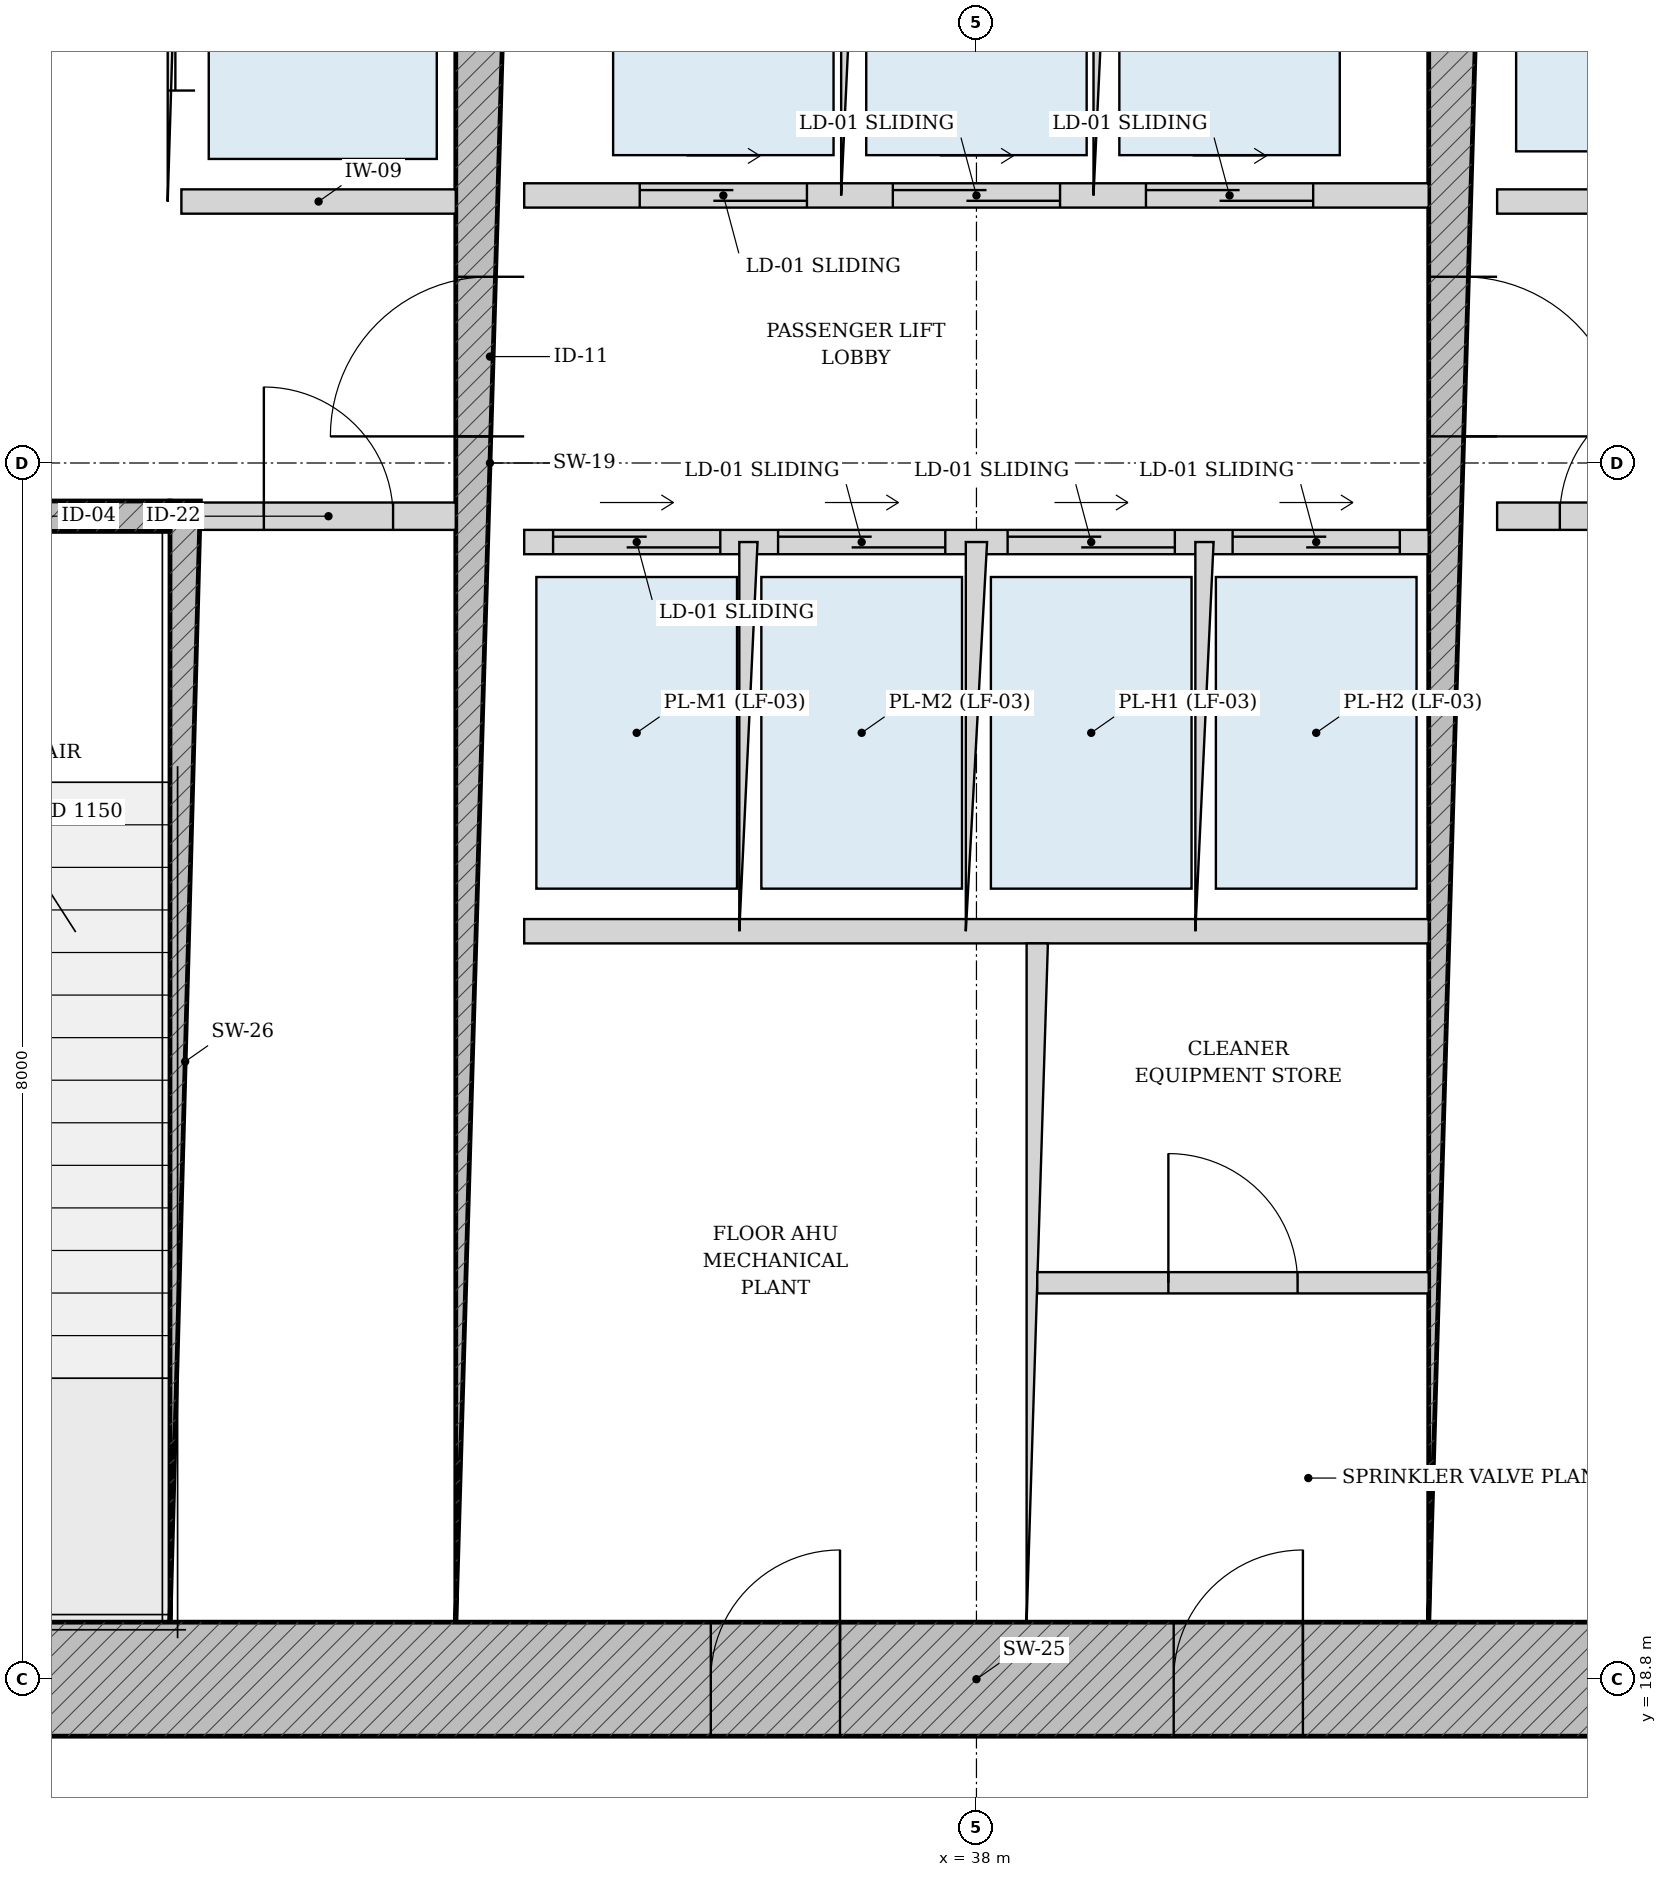
"""IFC4 building model, lengths in metres.
Left out: names, types, materials, properties, quantities, classifications, styles, units other than length and angle.
Written with IfcOpenShell. Run it as: python <this file> out.ifc"""

import sys

from ifc_helpers import new_model, si_unit, direction, frame, frame_2d, origin, place, context, subcontext, project, spatial, rectangle, extrude, source, transform, mapped, element, fill, save


model = new_model("IFC4")
c1 = context("Model", 3, precision=1e-05, world=origin(), true_north=direction((-0.2419218956, 0.970295726276)))
c2 = subcontext(c1, "Body", "Model", "MODEL_VIEW")
j1 = project(units=[si_unit("LENGTHUNIT", "METRE"), si_unit("PLANEANGLEUNIT", "RADIAN")], contexts=[c1])
p1 = place(None, origin())
s1 = spatial("IfcSite", under=j1, at=p1, CompositionType="ELEMENT")
p2 = place(p1, origin())
s2 = spatial("IfcBuilding", under=s1, at=p2, CompositionType="ELEMENT")
p3 = place(p2, origin())
s3 = spatial("IfcBuildingStorey", under=s2, at=p3, CompositionType="ELEMENT", Elevation=0.0)
p4 = place(p3, frame((28.625, 18.8, 0.0), z_axis=(0.0, 0.0, 1.0), x_axis=(1.0, 0.0, 0.0)))
e1 = element("IfcWall", 1, at=p4, inside=s3, PredefinedType="SHEAR", context=c2, shape_type="SweptSolid", body=[
    extrude(rectangle(XDim=18.75, YDim=0.75, at=frame_2d((9.375, 0.0))), origin(), (0.0, 0.0, 1.0), 5.1),
])
p5 = place(p4, frame((7.627, 0.0, 0.0)))
e2 = element("IfcOpeningElement", 2, at=p5, cuts=e1, PredefinedType="OPENING", context=c2, shape_type="SweptSolid", body=[
    extrude(rectangle(XDim=0.85, YDim=2.1, at=frame_2d((0.425, 1.05))), frame((0.0, 0.385, 0.0), z_axis=(0.0, -1.0, 0.0), x_axis=(1.0, 0.0, 0.0)), (0.0, 0.0, 1.0), 0.77),
])
p6 = place(p4, frame((10.673, 0.0, 0.0)))
e3 = element("IfcOpeningElement", 3, at=p6, cuts=e1, PredefinedType="OPENING", context=c2, shape_type="SweptSolid", body=[
    extrude(rectangle(XDim=0.85, YDim=2.1, at=frame_2d((0.425, 1.05))), frame((0.0, 0.385, 0.0), z_axis=(0.0, -1.0, 0.0), x_axis=(1.0, 0.0, 0.0)), (0.0, 0.0, 1.0), 0.77),
])
p7 = place(p3, frame((32.795, 19.175, 0.0), z_axis=(0.0, 0.0, 1.0), x_axis=(0.0, 1.0, 0.0)))
e4 = element("IfcWall", 4, at=p7, inside=s3, PredefinedType="SOLIDWALL", context=c2, shape_type="SweptSolid", body=[
    extrude(rectangle(XDim=7.375, YDim=0.2, at=frame_2d((3.688, 0.0))), origin(), (0.0, 0.0, 1.0), 5.1),
])
p8 = place(p3, frame((29.375, 26.45, 0.0), z_axis=(0.0, 0.0, 1.0), x_axis=(1.0, 0.0, 0.0)))
e5 = element("IfcWall", 5, at=p8, inside=s3, PredefinedType="SOLIDWALL", context=c2, shape_type="SweptSolid", body=[
    extrude(rectangle(XDim=3.32, YDim=0.2, at=frame_2d((1.66, 0.0))), origin(), (0.0, 0.0, 1.0), 5.1),
])
p9 = place(p8, frame((1.185, 0.0, 0.0)))
e6 = element("IfcOpeningElement", 6, at=p9, cuts=e5, PredefinedType="OPENING", context=c2, shape_type="SweptSolid", body=[
    extrude(rectangle(XDim=0.95, YDim=2.15, at=frame_2d((0.475, 1.075))), frame((0.0, 0.11, 0.0), z_axis=(0.0, -1.0, 0.0), x_axis=(1.0, 0.0, 0.0)), (0.0, 0.0, 1.0), 0.22),
])
p10 = place(p3, frame((34.8, 19.175, 0.0), z_axis=(0.0, 0.0, 1.0), x_axis=(0.0, 1.0, 0.0)))
e7 = element("IfcWall", 7, at=p10, inside=s3, PredefinedType="SHEAR", context=c2, shape_type="SweptSolid", body=[
    extrude(rectangle(XDim=15.25, YDim=0.45, at=frame_2d((7.625, 0.0))), origin(), (0.0, 0.0, 1.0), 5.1),
])
p11 = place(p10, frame((7.8, 0.0, 0.0)))
e8 = element("IfcOpeningElement", 8, at=p11, cuts=e7, PredefinedType="OPENING", context=c2, shape_type="SweptSolid", body=[
    extrude(rectangle(XDim=1.05, YDim=2.15, at=frame_2d((0.525, 1.075))), frame((0.0, 0.235, 0.0), z_axis=(0.0, -1.0, 0.0), x_axis=(1.0, 0.0, 0.0)), (0.0, 0.0, 1.0), 0.47),
])
p12 = place(p3, frame((41.2, 19.175, 0.0), z_axis=(0.0, 0.0, 1.0), x_axis=(0.0, 1.0, 0.0)))
e9 = element("IfcWall", 9, at=p12, inside=s3, PredefinedType="SHEAR", context=c2, shape_type="SweptSolid", body=[
    extrude(rectangle(XDim=15.25, YDim=0.45, at=frame_2d((7.625, 0.0))), origin(), (0.0, 0.0, 1.0), 5.1),
])
p13 = place(p12, frame((7.8, 0.0, 0.0)))
e10 = element("IfcOpeningElement", 10, at=p13, cuts=e9, PredefinedType="OPENING", context=c2, shape_type="SweptSolid", body=[
    extrude(rectangle(XDim=1.05, YDim=2.15, at=frame_2d((0.525, 1.075))), frame((0.0, 0.235, 0.0), z_axis=(0.0, -1.0, 0.0), x_axis=(1.0, 0.0, 0.0)), (0.0, 0.0, 1.0), 0.47),
])
p14 = place(p3, frame((32.9, 26.45, 0.0), z_axis=(0.0, 0.0, 1.0), x_axis=(1.0, 0.0, 0.0)))
e11 = element("IfcWall", 11, at=p14, inside=s3, PredefinedType="PARTITIONING", context=c2, shape_type="SweptSolid", body=[
    extrude(rectangle(XDim=1.675, YDim=0.18, at=frame_2d((0.837, 0.0))), origin(), (0.0, 0.0, 1.0), 5.1),
])
p15 = place(p14, frame((0.413, 0.0, 0.0)))
e12 = element("IfcOpeningElement", 12, at=p15, cuts=e11, PredefinedType="OPENING", context=c2, shape_type="SweptSolid", body=[
    extrude(rectangle(XDim=0.85, YDim=2.1, at=frame_2d((0.425, 1.05))), frame((0.0, 0.1, 0.0), z_axis=(0.0, -1.0, 0.0), x_axis=(1.0, 0.0, 0.0)), (0.0, 0.0, 1.0), 0.2),
])
p16 = place(p3, frame((41.425, 26.45, 0.0), z_axis=(0.0, 0.0, 1.0), x_axis=(1.0, 0.0, 0.0)))
e13 = element("IfcWall", 13, at=p16, inside=s3, PredefinedType="PARTITIONING", context=c2, shape_type="SweptSolid", body=[
    extrude(rectangle(XDim=1.675, YDim=0.18, at=frame_2d((0.837, 0.0))), origin(), (0.0, 0.0, 1.0), 5.1),
])
p17 = place(p16, frame((0.413, 0.0, 0.0)))
e14 = element("IfcOpeningElement", 14, at=p17, cuts=e13, PredefinedType="OPENING", context=c2, shape_type="SweptSolid", body=[
    extrude(rectangle(XDim=0.85, YDim=2.1, at=frame_2d((0.425, 1.05))), frame((0.0, 0.1, 0.0), z_axis=(0.0, -1.0, 0.0), x_axis=(1.0, 0.0, 0.0)), (0.0, 0.0, 1.0), 0.2),
])
p18 = place(p3, frame((32.77, 28.52, 0.0), z_axis=(0.0, 0.0, 1.0), x_axis=(0.0, 1.0, 0.0)))
e15 = element("IfcWall", 15, at=p18, inside=s3, PredefinedType="PARTITIONING", context=c2, shape_type="SweptSolid", body=[
    extrude(rectangle(XDim=5.905, YDim=0.18, at=frame_2d((2.953, 0.0))), origin(), (0.0, 0.0, 1.0), 5.1),
])
p19 = place(p18, frame((3.655, 0.0, 0.0)))
e16 = element("IfcOpeningElement", 16, at=p19, cuts=e15, PredefinedType="OPENING", context=c2, shape_type="SweptSolid", body=[
    extrude(rectangle(XDim=1.15, YDim=2.2, at=frame_2d((0.575, 1.1))), frame((0.0, 0.1, 0.0), z_axis=(0.0, -1.0, 0.0), x_axis=(1.0, 0.0, 0.0)), (0.0, 0.0, 1.0), 0.2),
])
p20 = place(p18, frame((0.73, 0.0, 0.0)))
e17 = element("IfcOpeningElement", 17, at=p20, cuts=e15, PredefinedType="OPENING", context=c2, shape_type="SweptSolid", body=[
    extrude(rectangle(XDim=1.2, YDim=2.25, at=frame_2d((0.6, 1.125))), frame((0.0, 0.1, 0.0), z_axis=(0.0, -1.0, 0.0), x_axis=(1.0, 0.0, 0.0)), (0.0, 0.0, 1.0), 0.2),
])
for number, where, z_axis, x_axis in (
    (18, (32.77, 28.52, 0.0), (0.0, 0.0, 1.0), (1.0, 0.0, 0.0)),
    (19, (41.425, 28.52, 0.0), (0.0, 0.0, 1.0), (1.0, 0.0, 0.0)),
):
    element("IfcWall", number, at=place(p3, frame(where, z_axis=z_axis, x_axis=x_axis)), inside=s3, PredefinedType="PARTITIONING", context=c2, shape_type="SweptSolid", body=[
        extrude(rectangle(XDim=1.805, YDim=0.16, at=frame_2d((0.902, 0.0))), origin(), (0.0, 0.0, 1.0), 5.1),
    ])
p21 = place(p3, frame((35.025, 28.56, 0.0), z_axis=(0.0, 0.0, 1.0), x_axis=(1.0, 0.0, 0.0)))
e20 = element("IfcWall", 20, at=p21, inside=s3, PredefinedType="PARTITIONING", context=c2, shape_type="SweptSolid", body=[
    extrude(rectangle(XDim=5.95, YDim=0.16, at=frame_2d((2.975, 0.0))), origin(), (0.0, 0.0, 1.0), 5.1),
])
p22 = place(p21, frame((0.76, 0.0, 0.0)))
e21 = element("IfcOpeningElement", 21, at=p22, cuts=e20, PredefinedType="OPENING", context=c2, shape_type="SweptSolid", body=[
    extrude(rectangle(XDim=1.1, YDim=2.2, at=frame_2d((0.55, 1.1))), frame((0.0, 0.09, 0.0), z_axis=(0.0, -1.0, 0.0), x_axis=(1.0, 0.0, 0.0)), (0.0, 0.0, 1.0), 0.18),
])
p23 = place(p21, frame((2.425, 0.0, 0.0)))
e22 = element("IfcOpeningElement", 22, at=p23, cuts=e20, PredefinedType="OPENING", context=c2, shape_type="SweptSolid", body=[
    extrude(rectangle(XDim=1.1, YDim=2.2, at=frame_2d((0.55, 1.1))), frame((0.0, 0.09, 0.0), z_axis=(0.0, -1.0, 0.0), x_axis=(1.0, 0.0, 0.0)), (0.0, 0.0, 1.0), 0.18),
])
p24 = place(p21, frame((4.09, 0.0, 0.0)))
e23 = element("IfcOpeningElement", 23, at=p24, cuts=e20, PredefinedType="OPENING", context=c2, shape_type="SweptSolid", body=[
    extrude(rectangle(XDim=1.1, YDim=2.2, at=frame_2d((0.55, 1.1))), frame((0.0, 0.09, 0.0), z_axis=(0.0, -1.0, 0.0), x_axis=(1.0, 0.0, 0.0)), (0.0, 0.0, 1.0), 0.18),
])
for number, where, z_axis, x_axis in (
    (24, (37.17, 28.56, 0.0), (0.0, 0.0, 1.0), (0.0, 1.0, 0.0)),
    (25, (38.83, 28.56, 0.0), (0.0, 0.0, 1.0), (0.0, 1.0, 0.0)),
):
    element("IfcWall", number, at=place(p3, frame(where, z_axis=z_axis, x_axis=x_axis)), inside=s3, PredefinedType="PARTITIONING", context=c2, shape_type="SweptSolid", body=[
        extrude(rectangle(XDim=2.56, YDim=0.12, at=frame_2d((1.28, 0.0))), origin(), (0.0, 0.0, 1.0), 5.1),
    ])
p25 = place(p3, frame((35.025, 26.28, 0.0), z_axis=(0.0, 0.0, 1.0), x_axis=(1.0, 0.0, 0.0)))
e26 = element("IfcWall", 26, at=p25, inside=s3, PredefinedType="PARTITIONING", context=c2, shape_type="SweptSolid", body=[
    extrude(rectangle(XDim=5.95, YDim=0.16, at=frame_2d((2.975, 0.0))), origin(), (0.0, 0.0, 1.0), 5.1),
])
p26 = place(p25, frame((0.19, 0.0, 0.0)))
e27 = element("IfcOpeningElement", 27, at=p26, cuts=e26, PredefinedType="OPENING", context=c2, shape_type="SweptSolid", body=[
    extrude(rectangle(XDim=1.1, YDim=2.2, at=frame_2d((0.55, 1.1))), frame((0.0, 0.09, 0.0), z_axis=(0.0, -1.0, 0.0), x_axis=(1.0, 0.0, 0.0)), (0.0, 0.0, 1.0), 0.18),
])
p27 = place(p25, frame((1.67, 0.0, 0.0)))
e28 = element("IfcOpeningElement", 28, at=p27, cuts=e26, PredefinedType="OPENING", context=c2, shape_type="SweptSolid", body=[
    extrude(rectangle(XDim=1.1, YDim=2.2, at=frame_2d((0.55, 1.1))), frame((0.0, 0.09, 0.0), z_axis=(0.0, -1.0, 0.0), x_axis=(1.0, 0.0, 0.0)), (0.0, 0.0, 1.0), 0.18),
])
p28 = place(p25, frame((3.18, 0.0, 0.0)))
e29 = element("IfcOpeningElement", 29, at=p28, cuts=e26, PredefinedType="OPENING", context=c2, shape_type="SweptSolid", body=[
    extrude(rectangle(XDim=1.1, YDim=2.2, at=frame_2d((0.55, 1.1))), frame((0.0, 0.09, 0.0), z_axis=(0.0, -1.0, 0.0), x_axis=(1.0, 0.0, 0.0)), (0.0, 0.0, 1.0), 0.18),
])
p29 = place(p25, frame((4.66, 0.0, 0.0)))
e30 = element("IfcOpeningElement", 30, at=p29, cuts=e26, PredefinedType="OPENING", context=c2, shape_type="SweptSolid", body=[
    extrude(rectangle(XDim=1.1, YDim=2.2, at=frame_2d((0.55, 1.1))), frame((0.0, 0.09, 0.0), z_axis=(0.0, -1.0, 0.0), x_axis=(1.0, 0.0, 0.0)), (0.0, 0.0, 1.0), 0.18),
])
p30 = place(p3, frame((35.025, 23.72, 0.0), z_axis=(0.0, 0.0, 1.0), x_axis=(1.0, 0.0, 0.0)))
e31 = element("IfcWall", 31, at=p30, inside=s3, PredefinedType="PARTITIONING", context=c2, shape_type="SweptSolid", body=[
    extrude(rectangle(XDim=5.95, YDim=0.16, at=frame_2d((2.975, 0.0))), origin(), (0.0, 0.0, 1.0), 5.1),
])
p31 = place(p3, frame((36.5, 23.72, 0.0), z_axis=(0.0, 0.0, 1.0), x_axis=(0.0, 1.0, 0.0)))
e32 = element("IfcWall", 32, at=p31, inside=s3, PredefinedType="PARTITIONING", context=c2, shape_type="SweptSolid", body=[
    extrude(rectangle(XDim=2.56, YDim=0.12, at=frame_2d((1.28, 0.0))), origin(), (0.0, 0.0, 1.0), 5.1),
])
p32 = place(p3, frame((38.0, 23.72, 0.0), z_axis=(0.0, 0.0, 1.0), x_axis=(0.0, 1.0, 0.0)))
e33 = element("IfcWall", 33, at=p32, inside=s3, PredefinedType="PARTITIONING", context=c2, shape_type="SweptSolid", body=[
    extrude(rectangle(XDim=2.56, YDim=0.14, at=frame_2d((1.28, 0.0))), origin(), (0.0, 0.0, 1.0), 5.1),
])
p33 = place(p3, frame((39.5, 23.72, 0.0), z_axis=(0.0, 0.0, 1.0), x_axis=(0.0, 1.0, 0.0)))
e34 = element("IfcWall", 34, at=p33, inside=s3, PredefinedType="PARTITIONING", context=c2, shape_type="SweptSolid", body=[
    extrude(rectangle(XDim=2.56, YDim=0.12, at=frame_2d((1.28, 0.0))), origin(), (0.0, 0.0, 1.0), 5.1),
])
p34 = place(p3, frame((38.4, 19.175, 0.0), z_axis=(0.0, 0.0, 1.0), x_axis=(0.0, 1.0, 0.0)))
e35 = element("IfcWall", 35, at=p34, inside=s3, PredefinedType="PARTITIONING", context=c2, shape_type="SweptSolid", body=[
    extrude(rectangle(XDim=4.465, YDim=0.14, at=frame_2d((2.232, 0.0))), origin(), (0.0, 0.0, 1.0), 5.1),
])
p35 = place(p3, frame((38.4, 21.407, 0.0), z_axis=(0.0, 0.0, 1.0), x_axis=(1.0, 0.0, 0.0)))
e36 = element("IfcWall", 36, at=p35, inside=s3, PredefinedType="PARTITIONING", context=c2, shape_type="SweptSolid", body=[
    extrude(rectangle(XDim=2.575, YDim=0.14, at=frame_2d((1.288, 0.0))), origin(), (0.0, 0.0, 1.0), 5.1),
])
p36 = place(p35, frame((0.863, 0.0, 0.0)))
e37 = element("IfcOpeningElement", 37, at=p36, cuts=e36, PredefinedType="OPENING", context=c2, shape_type="SweptSolid", body=[
    extrude(rectangle(XDim=0.85, YDim=2.1, at=frame_2d((0.425, 1.05))), frame((0.0, 0.08, 0.0), z_axis=(0.0, -1.0, 0.0), x_axis=(1.0, 0.0, 0.0)), (0.0, 0.0, 1.0), 0.16),
])
m1 = source(origin(), c2, "Body", "SweptSolid", [
    extrude(rectangle(XDim=1.05, YDim=2.15, at=frame_2d((0.525, 1.075))), frame((0.0, 0.025, 0.0), z_axis=(0.0, -1.0, 0.0), x_axis=(1.0, 0.0, 0.0)), (0.0, 0.0, 1.0), 0.05),
])
p37 = place(p11, origin())
e38 = element("IfcDoor", 38, at=p37, inside=s3, OperationType="SINGLE_SWING_LEFT", PredefinedType="DOOR", context=c2, shape_type="MappedRepresentation", body=[
    mapped(m1, transform((0.0, 0.0, 0.0), scale=1.0)),
])
fill(e8, e38)
p38 = place(p13, frame((1.05, 0.0, 0.0), z_axis=(0.0, 0.0, 1.0), x_axis=(-1.0, 0.0, 0.0)))
e39 = element("IfcDoor", 39, at=p38, inside=s3, OperationType="SINGLE_SWING_RIGHT", PredefinedType="DOOR", context=c2, shape_type="MappedRepresentation", body=[
    mapped(m1, transform((0.0, 0.0, 0.0), scale=1.0)),
])
fill(e10, e39)
m2 = source(origin(), c2, "Body", "SweptSolid", [
    extrude(rectangle(XDim=0.85, YDim=2.1, at=frame_2d((0.425, 1.05))), frame((0.0, 0.025, 0.0), z_axis=(0.0, -1.0, 0.0), x_axis=(1.0, 0.0, 0.0)), (0.0, 0.0, 1.0), 0.05),
])
p39 = place(p15, origin())
e40 = element("IfcDoor", 40, at=p39, inside=s3, OperationType="SINGLE_SWING_LEFT", PredefinedType="DOOR", context=c2, shape_type="MappedRepresentation", body=[
    mapped(m2, transform((0.0, 0.0, 0.0), scale=1.0)),
])
fill(e12, e40)
p40 = place(p17, origin())
e41 = element("IfcDoor", 41, at=p40, inside=s3, OperationType="SINGLE_SWING_RIGHT", PredefinedType="DOOR", context=c2, shape_type="MappedRepresentation", body=[
    mapped(m2, transform((0.0, 0.0, 0.0), scale=1.0)),
])
fill(e14, e41)
p41 = place(p5, origin())
e42 = element("IfcDoor", 42, at=p41, inside=s3, OperationType="SINGLE_SWING_RIGHT", PredefinedType="DOOR", context=c2, shape_type="MappedRepresentation", body=[
    mapped(m2, transform((0.0, 0.0, 0.0), scale=1.0)),
])
fill(e2, e42)
p42 = place(p6, origin())
e43 = element("IfcDoor", 43, at=p42, inside=s3, OperationType="SINGLE_SWING_RIGHT", PredefinedType="DOOR", context=c2, shape_type="MappedRepresentation", body=[
    mapped(m2, transform((0.0, 0.0, 0.0), scale=1.0)),
])
fill(e3, e43)
p43 = place(p36, origin())
e44 = element("IfcDoor", 44, at=p43, inside=s3, OperationType="SINGLE_SWING_LEFT", PredefinedType="DOOR", context=c2, shape_type="MappedRepresentation", body=[
    mapped(m2, transform((0.0, 0.0, 0.0), scale=1.0)),
])
fill(e37, e44)
m3 = source(origin(), c2, "Body", "SweptSolid", [
    extrude(rectangle(XDim=1.2, YDim=2.25, at=frame_2d((0.6, 1.125))), frame((0.0, 0.025, 0.0), z_axis=(0.0, -1.0, 0.0), x_axis=(1.0, 0.0, 0.0)), (0.0, 0.0, 1.0), 0.05),
])
p44 = place(p20, origin())
e45 = element("IfcDoor", 45, at=p44, inside=s3, OperationType="DOUBLE_DOOR_SLIDING", PredefinedType="DOOR", context=c2, shape_type="MappedRepresentation", body=[
    mapped(m3, transform((0.0, 0.0, 0.0), scale=1.0)),
])
fill(e17, e45)
m4 = source(origin(), c2, "Body", "SweptSolid", [
    extrude(rectangle(XDim=1.1, YDim=2.2, at=frame_2d((0.55, 1.1))), frame((0.0, 0.025, 0.0), z_axis=(0.0, -1.0, 0.0), x_axis=(1.0, 0.0, 0.0)), (0.0, 0.0, 1.0), 0.05),
])
p45 = place(p22, origin())
e46 = element("IfcDoor", 46, at=p45, inside=s3, OperationType="DOUBLE_DOOR_SLIDING", PredefinedType="DOOR", context=c2, shape_type="MappedRepresentation", body=[
    mapped(m4, transform((0.0, 0.0, 0.0), scale=1.0)),
])
fill(e21, e46)
p46 = place(p23, origin())
e47 = element("IfcDoor", 47, at=p46, inside=s3, OperationType="DOUBLE_DOOR_SLIDING", PredefinedType="DOOR", context=c2, shape_type="MappedRepresentation", body=[
    mapped(m4, transform((0.0, 0.0, 0.0), scale=1.0)),
])
fill(e22, e47)
p47 = place(p24, origin())
e48 = element("IfcDoor", 48, at=p47, inside=s3, OperationType="DOUBLE_DOOR_SLIDING", PredefinedType="DOOR", context=c2, shape_type="MappedRepresentation", body=[
    mapped(m4, transform((0.0, 0.0, 0.0), scale=1.0)),
])
fill(e23, e48)
p48 = place(p26, origin())
e49 = element("IfcDoor", 49, at=p48, inside=s3, OperationType="DOUBLE_DOOR_SLIDING", PredefinedType="DOOR", context=c2, shape_type="MappedRepresentation", body=[
    mapped(m4, transform((0.0, 0.0, 0.0), scale=1.0)),
])
fill(e27, e49)
p49 = place(p27, origin())
e50 = element("IfcDoor", 50, at=p49, inside=s3, OperationType="DOUBLE_DOOR_SLIDING", PredefinedType="DOOR", context=c2, shape_type="MappedRepresentation", body=[
    mapped(m4, transform((0.0, 0.0, 0.0), scale=1.0)),
])
fill(e28, e50)
p50 = place(p28, origin())
e51 = element("IfcDoor", 51, at=p50, inside=s3, OperationType="DOUBLE_DOOR_SLIDING", PredefinedType="DOOR", context=c2, shape_type="MappedRepresentation", body=[
    mapped(m4, transform((0.0, 0.0, 0.0), scale=1.0)),
])
fill(e29, e51)
p51 = place(p29, origin())
e52 = element("IfcDoor", 52, at=p51, inside=s3, OperationType="DOUBLE_DOOR_SLIDING", PredefinedType="DOOR", context=c2, shape_type="MappedRepresentation", body=[
    mapped(m4, transform((0.0, 0.0, 0.0), scale=1.0)),
])
fill(e30, e52)
save(model, sys.argv[1])
